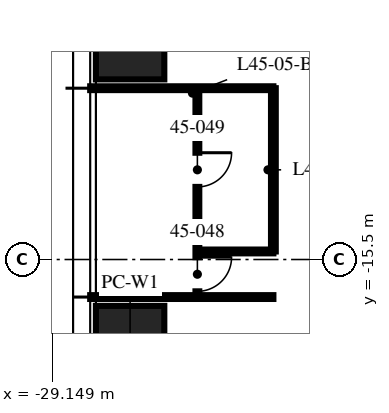
"""IFC4 building model, lengths in metres.
Left out: names, types, materials, properties, quantities, classifications, styles, units other than length and angle.
Written with IfcOpenShell. Run it as: python <this file> out.ifc"""

import sys

from ifc_helpers import new_model, si_unit, direction, frame, frame_2d, origin, origin_2d, place, context, subcontext, project, spatial, rectangle, hollow_rectangle, extrude, element, fill, save


model = new_model("IFC4")
c1 = context("Model", 3, precision=1e-05, world=origin(), true_north=direction((0.0, 1.0)))
c2 = subcontext(c1, "Body", "Model", "MODEL_VIEW")
j1 = project(units=[si_unit("LENGTHUNIT", "METRE"), si_unit("PLANEANGLEUNIT", "RADIAN")], contexts=[c1])
p1 = place(None, origin())
s1 = spatial("IfcSite", under=j1, at=p1, CompositionType="ELEMENT")
p2 = place(p1, origin())
s2 = spatial("IfcBuilding", under=s1, at=p2, CompositionType="ELEMENT")
p3 = place(p2, frame((0.0, 0.0, 178.5)))
s3 = spatial("IfcBuildingStorey", under=s2, at=p3, CompositionType="ELEMENT", Elevation=178.5)
for number, where, z_axis, x_axis in (
    (1, (-27.1, -18.32, 0.0), (0.0, 0.0, 1.0), (0.0, 1.0, 0.0)),
    (2, (-27.1, -9.16, 0.0), (0.0, 0.0, 1.0), (0.0, 1.0, 0.0)),
):
    element("IfcColumn", number, at=place(p3, frame(where, z_axis=z_axis, x_axis=x_axis)), inside=s3, PredefinedType="COLUMN", context=c2, shape_type="SweptSolid", body=[
        extrude(hollow_rectangle(XDim=3.2, YDim=1.8, WallThickness=0.2, at=origin_2d()), origin(), (0.0, 0.0, 1.0), 3.75),
    ])
for number, where, z_axis, x_axis in (
    (3, (-23.33, -10.992, 0.0), (0.0, 0.0, 1.0), (-1.0, 0.0, 0.0)),
    (4, (-23.33, -16.488, 0.0), (0.0, 0.0, 1.0), (-1.0, 0.0, 0.0)),
):
    element("IfcWall", number, at=place(p3, frame(where, z_axis=z_axis, x_axis=x_axis)), inside=s3, PredefinedType="PARTITIONING", context=c2, shape_type="SweptSolid", body=[
        extrude(rectangle(XDim=4.82, YDim=0.1, at=frame_2d((2.41, 0.0))), origin(), (0.0, 0.0, 1.0), 2.81),
    ])
p4 = place(p3, frame((-25.33, -10.992, 0.0), z_axis=(0.0, 0.0, 1.0), x_axis=(0.0, -1.0, 0.0)))
e5 = element("IfcWall", 5, at=p4, inside=s3, PredefinedType="PARTITIONING", context=c2, shape_type="SweptSolid", body=[
    extrude(rectangle(XDim=5.496, YDim=0.1, at=frame_2d((2.748, 0.0))), origin(), (0.0, 0.0, 1.0), 2.81),
])
p5 = place(p4, frame((4.446, 0.0, 0.0)))
e6 = element("IfcOpeningElement", 6, at=p5, cuts=e5, PredefinedType="OPENING", context=c2, shape_type="SweptSolid", body=[
    extrude(rectangle(XDim=0.9, YDim=2.1, at=frame_2d((0.45, 1.05))), frame((0.0, 0.06, 0.0), z_axis=(0.0, -1.0, 0.0), x_axis=(1.0, 0.0, 0.0)), (0.0, 0.0, 1.0), 0.12),
])
p6 = place(p4, frame((1.698, 0.0, 0.0)))
e7 = element("IfcOpeningElement", 7, at=p6, cuts=e5, PredefinedType="OPENING", context=c2, shape_type="SweptSolid", body=[
    extrude(rectangle(XDim=0.9, YDim=2.1, at=frame_2d((0.45, 1.05))), frame((0.0, 0.06, 0.0), z_axis=(0.0, -1.0, 0.0), x_axis=(1.0, 0.0, 0.0)), (0.0, 0.0, 1.0), 0.12),
])
p7 = place(p3, frame((-23.33, -15.288, 0.0), z_axis=(0.0, 0.0, 1.0), x_axis=(-1.0, 0.0, 0.0)))
e8 = element("IfcWall", 8, at=p7, inside=s3, PredefinedType="PARTITIONING", context=c2, shape_type="SweptSolid", body=[
    extrude(rectangle(XDim=2.0, YDim=0.1, at=frame_2d((1.0, 0.0))), origin(), (0.0, 0.0, 1.0), 3.5),
])
p8 = place(p3, frame((-23.33, -10.992, 0.0), z_axis=(0.0, 0.0, 1.0), x_axis=(0.0, -1.0, 0.0)))
e9 = element("IfcWall", 9, at=p8, inside=s3, PredefinedType="PARTITIONING", context=c2, shape_type="SweptSolid", body=[
    extrude(rectangle(XDim=4.296, YDim=0.125, at=frame_2d((2.148, 0.0))), origin(), (0.0, 0.0, 1.0), 2.81),
])
p9 = place(p5, origin())
e10 = element("IfcDoor", 10, at=p9, inside=s3, OperationType="SINGLE_SWING_LEFT", PredefinedType="DOOR", context=c2, shape_type="SweptSolid", body=[
    extrude(rectangle(XDim=0.9, YDim=2.1, at=frame_2d((0.45, 1.05))), frame((0.0, 0.025, 0.0), z_axis=(0.0, -1.0, 0.0), x_axis=(1.0, 0.0, 0.0)), (0.0, 0.0, 1.0), 0.05),
])
fill(e6, e10)
p10 = place(p6, origin())
e11 = element("IfcDoor", 11, at=p10, inside=s3, OperationType="SINGLE_SWING_LEFT", PredefinedType="DOOR", context=c2, shape_type="SweptSolid", body=[
    extrude(rectangle(XDim=0.9, YDim=2.1, at=frame_2d((0.45, 1.05))), frame((0.0, 0.025, 0.0), z_axis=(0.0, -1.0, 0.0), x_axis=(1.0, 0.0, 0.0)), (0.0, 0.0, 1.0), 0.05),
])
fill(e7, e11)
save(model, sys.argv[1])
